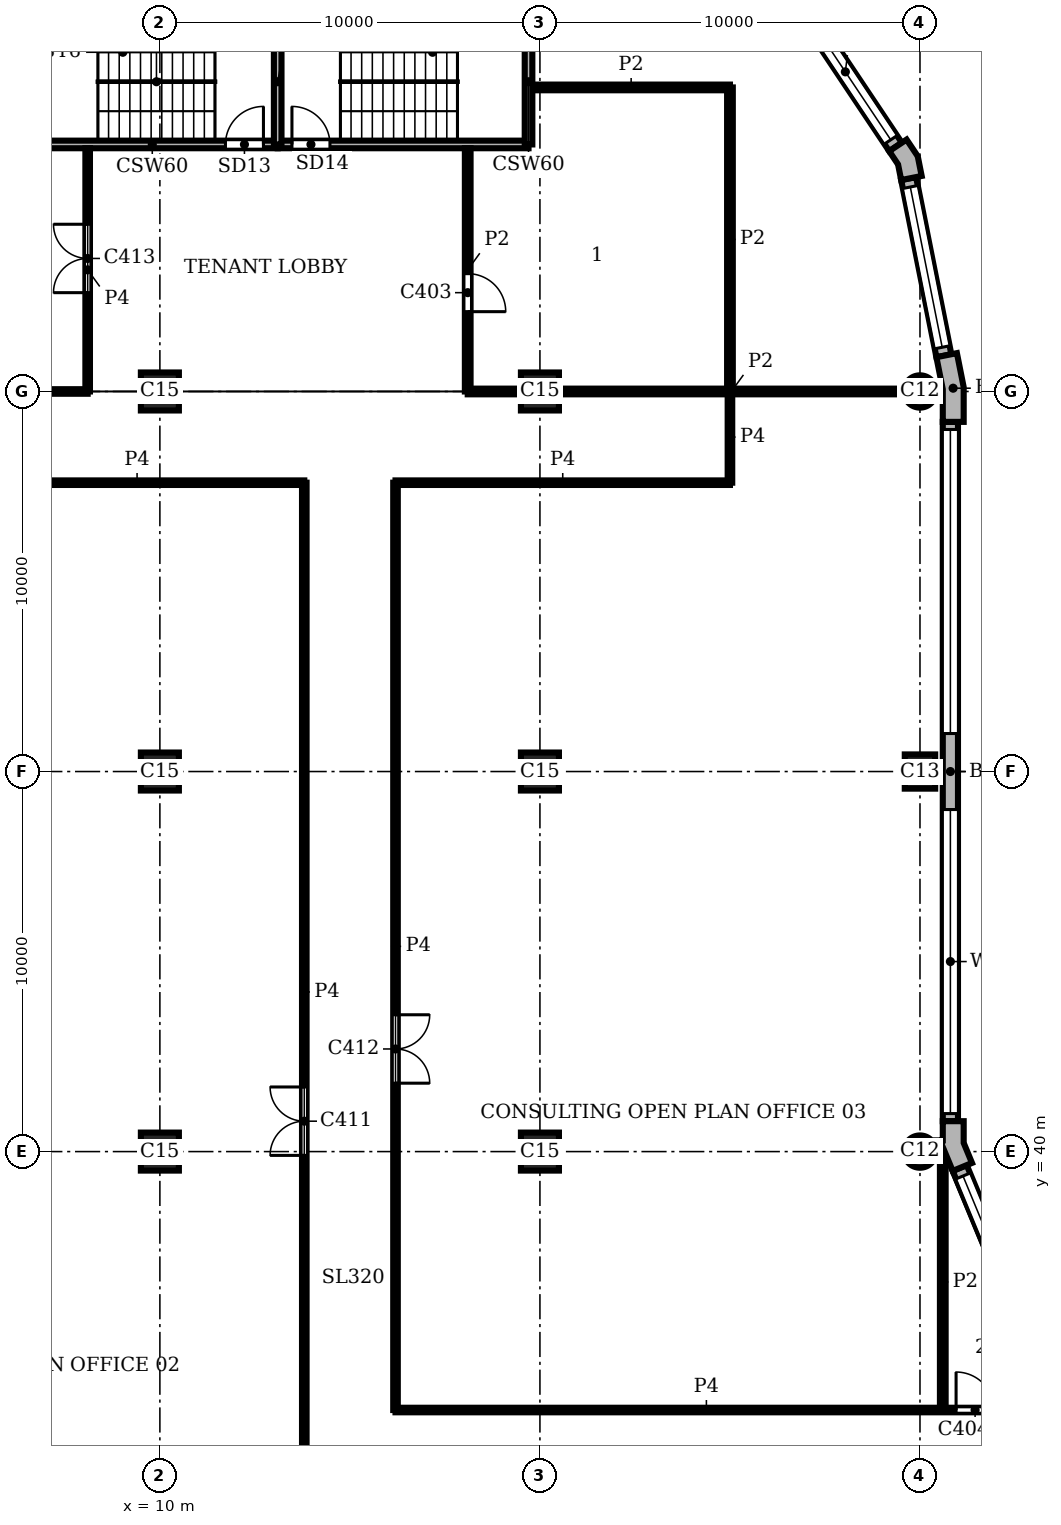
"""IFC4 building model, lengths in metres.
Left out: names, types, materials, properties, quantities, classifications, styles, units other than length and angle.
Written with IfcOpenShell. Run it as: python <this file> out.ifc"""

import sys

from ifc_helpers import new_model, si_unit, direction, frame, frame_2d, origin, origin_2d, place, context, subcontext, project, spatial, polyline, rectangle, circle, outline, extrude, element, fill, save


model = new_model("IFC4")
c1 = context("Model", 3, precision=1e-05, world=origin(), true_north=direction((0.0, 1.0)))
c2 = subcontext(c1, "Body", "Model", "MODEL_VIEW")
j1 = project(units=[si_unit("LENGTHUNIT", "METRE"), si_unit("PLANEANGLEUNIT", "RADIAN")], contexts=[c1])
p1 = place(None, origin())
s1 = spatial("IfcSite", under=j1, at=p1, CompositionType="ELEMENT")
p2 = place(p1, origin())
s2 = spatial("IfcBuilding", under=s1, at=p2, CompositionType="ELEMENT")
p3 = place(p2, frame((0.0, 0.0, 278.7)))
s3 = spatial("IfcBuildingStorey", under=s2, at=p3, CompositionType="ELEMENT", Elevation=278.7)
p4 = place(p3, frame((30.0, 40.0, 0.0), z_axis=(0.0, 0.0, 1.0), x_axis=(1.0, 0.0, 0.0)))
e1 = element("IfcColumn", 1, at=p4, inside=s3, PredefinedType="COLUMN", context=c2, shape_type="SweptSolid", body=[
    extrude(circle(Radius=0.425, at=origin_2d()), origin(), (0.0, 0.0, 1.0), 3.9),
])
p5 = place(p3, frame((30.0, 50.0, 0.0), z_axis=(0.0, 0.0, 1.0), x_axis=(0.0, 1.0, 0.0)))
e2 = element("IfcColumn", 2, at=p5, inside=s3, PredefinedType="COLUMN", context=c2, shape_type="SweptSolid", body=[
    extrude(rectangle(XDim=0.9, YDim=0.8, at=origin_2d()), origin(), (0.0, 0.0, 1.0), 3.9),
])
p6 = place(p3, frame((30.0, 60.0, 0.0), z_axis=(0.0, 0.0, 1.0), x_axis=(1.0, 0.0, 0.0)))
e3 = element("IfcColumn", 3, at=p6, inside=s3, PredefinedType="COLUMN", context=c2, shape_type="SweptSolid", body=[
    extrude(circle(Radius=0.425, at=origin_2d()), origin(), (0.0, 0.0, 1.0), 3.9),
])
for number, where, z_axis, x_axis in (
    (4, (10.0, 40.0, 0.0), (0.0, 0.0, 1.0), (1.0, 0.0, 0.0)),
    (5, (10.0, 50.0, 0.0), (0.0, 0.0, 1.0), (1.0, 0.0, 0.0)),
    (6, (10.0, 60.0, 0.0), (0.0, 0.0, 1.0), (1.0, 0.0, 0.0)),
    (7, (20.0, 40.0, 0.0), (0.0, 0.0, 1.0), (1.0, 0.0, 0.0)),
    (8, (20.0, 50.0, 0.0), (0.0, 0.0, 1.0), (1.0, 0.0, 0.0)),
    (9, (20.0, 60.0, 0.0), (0.0, 0.0, 1.0), (1.0, 0.0, 0.0)),
):
    element("IfcColumn", number, at=place(p3, frame(where, z_axis=z_axis, x_axis=x_axis)), inside=s3, PredefinedType="COLUMN", context=c2, shape_type="SweptSolid", body=[
        extrude(rectangle(XDim=1.0, YDim=1.0, at=origin_2d()), origin(), (0.0, 0.0, 1.0), 3.9),
    ])
p7 = place(p3, origin())
e10 = element("IfcWall", 10, at=p7, inside=s3, PredefinedType="SOLIDWALL", context=c2, shape_type="SweptSolid", body=[
    extrude(outline(polyline([(30.62, 39.995), (30.62, 40.071), (30.861, 39.49), (31.23, 39.644), (31.369, 39.701), (31.15, 40.229), (31.15, 40.8), (31.0, 40.8), (30.6, 40.8), (30.6, 40.295), (30.425, 40.295), (30.425, 39.995), (30.62, 39.995)])), origin(), (0.0, 0.0, 1.0), 3.9),
])
e11 = element("IfcWall", 11, at=p7, inside=s3, PredefinedType="SOLIDWALL", context=c2, shape_type="SweptSolid", body=[
    extrude(outline(polyline([(31.0, 59.2), (31.15, 59.2), (31.15, 60.113), (30.972, 61.009), (30.825, 60.98), (30.432, 60.902), (30.6, 60.059), (30.6, 59.2), (31.0, 59.2)])), origin(), (0.0, 0.0, 1.0), 3.9),
])
e12 = element("IfcWall", 12, at=p7, inside=s3, PredefinedType="SOLIDWALL", context=c2, shape_type="SweptSolid", body=[
    extrude(outline(polyline([(29.897, 65.641), (30.045, 65.67), (29.941, 66.189), (29.648, 66.629), (29.523, 66.545), (29.19, 66.323), (29.423, 65.974), (29.505, 65.563), (29.897, 65.641)])), origin(), (0.0, 0.0, 1.0), 3.9),
])
p8 = place(p3, frame((33.362, 33.974, 0.0), z_axis=(0.0, 0.0, 1.0), x_axis=(-0.382655745237, 0.923891000409, 0.0)))
e13 = element("IfcWall", 13, at=p8, inside=s3, PredefinedType="SOLIDWALL", context=c2, shape_type="SweptSolid", body=[
    extrude(rectangle(XDim=6.053, YDim=0.4, at=frame_2d((3.027, 0.0))), origin(), (0.0, 0.0, 1.0), 3.9),
])
p9 = place(p8, frame((0.227, 0.0, 0.9)))
e14 = element("IfcOpeningElement", 14, at=p9, cuts=e13, PredefinedType="OPENING", context=c2, shape_type="SweptSolid", body=[
    extrude(rectangle(XDim=5.6, YDim=2.35, at=frame_2d((2.8, 1.175))), frame((0.0, 0.21, 0.0), z_axis=(0.0, -1.0, 0.0), x_axis=(1.0, 0.0, 0.0)), (0.0, 0.0, 1.0), 0.42),
])
p10 = place(p3, frame((30.8, 40.8, 0.0), z_axis=(0.0, 0.0, 1.0), x_axis=(0.0, 1.0, 0.0)))
e15 = element("IfcWall", 15, at=p10, inside=s3, PredefinedType="SOLIDWALL", context=c2, shape_type="SweptSolid", body=[
    extrude(rectangle(XDim=18.4, YDim=0.4, at=frame_2d((9.2, 0.0))), origin(), (0.0, 0.0, 1.0), 3.9),
])
p11 = place(p10, frame((0.2, 0.0, 0.9)))
e16 = element("IfcOpeningElement", 16, at=p11, cuts=e15, PredefinedType="OPENING", context=c2, shape_type="SweptSolid", body=[
    extrude(rectangle(XDim=8.0, YDim=2.35, at=frame_2d((4.0, 1.175))), frame((0.0, 0.21, 0.0), z_axis=(0.0, -1.0, 0.0), x_axis=(1.0, 0.0, 0.0)), (0.0, 0.0, 1.0), 0.42),
])
p12 = place(p10, frame((10.2, 0.0, 0.9)))
e17 = element("IfcOpeningElement", 17, at=p12, cuts=e15, PredefinedType="OPENING", context=c2, shape_type="SweptSolid", body=[
    extrude(rectangle(XDim=8.0, YDim=2.35, at=frame_2d((4.0, 1.175))), frame((0.0, 0.21, 0.0), z_axis=(0.0, -1.0, 0.0), x_axis=(1.0, 0.0, 0.0)), (0.0, 0.0, 1.0), 0.42),
])
p13 = place(p3, frame((30.629, 60.941, 0.0), z_axis=(0.0, 0.0, 1.0), x_axis=(-0.195098533057, 0.98078364709, 0.0)))
e18 = element("IfcWall", 18, at=p13, inside=s3, PredefinedType="SOLIDWALL", context=c2, shape_type="SweptSolid", body=[
    extrude(rectangle(XDim=4.753, YDim=0.4, at=frame_2d((2.376, 0.0))), origin(), (0.0, 0.0, 1.0), 3.9),
])
p14 = place(p13, frame((0.226, 0.0, 0.9)))
e19 = element("IfcOpeningElement", 19, at=p14, cuts=e18, PredefinedType="OPENING", context=c2, shape_type="SweptSolid", body=[
    extrude(rectangle(XDim=4.3, YDim=2.35, at=frame_2d((2.15, 1.175))), frame((0.0, 0.21, 0.0), z_axis=(0.0, -1.0, 0.0), x_axis=(1.0, 0.0, 0.0)), (0.0, 0.0, 1.0), 0.42),
])
p15 = place(p3, frame((29.357, 66.434, 0.0), z_axis=(0.0, 0.0, 1.0), x_axis=(-0.555541552266, 0.831488775454, 0.0)))
e20 = element("IfcWall", 20, at=p15, inside=s3, PredefinedType="SOLIDWALL", context=c2, shape_type="SweptSolid", body=[
    extrude(rectangle(XDim=4.753, YDim=0.4, at=frame_2d((2.376, 0.0))), origin(), (0.0, 0.0, 1.0), 3.9),
])
p16 = place(p15, frame((0.226, 0.0, 0.9)))
e21 = element("IfcOpeningElement", 21, at=p16, cuts=e20, PredefinedType="OPENING", context=c2, shape_type="SweptSolid", body=[
    extrude(rectangle(XDim=4.3, YDim=2.35, at=frame_2d((2.15, 1.175))), frame((0.0, 0.21, 0.0), z_axis=(0.0, -1.0, 0.0), x_axis=(1.0, 0.0, 0.0)), (0.0, 0.0, 1.0), 0.42),
])
p17 = place(p3, frame((6.5, 66.5, 0.0), z_axis=(0.0, 0.0, 1.0), x_axis=(1.0, 0.0, 0.0)))
e22 = element("IfcWall", 22, at=p17, inside=s3, PredefinedType="SHEAR", context=c2, shape_type="SweptSolid", body=[
    extrude(rectangle(XDim=6.6, YDim=0.2, at=frame_2d((3.3, 0.0))), origin(), (0.0, 0.0, 1.0), 3.58),
])
p18 = place(p17, frame((5.225, 0.0, 0.0)))
e23 = element("IfcOpeningElement", 23, at=p18, cuts=e22, PredefinedType="OPENING", context=c2, shape_type="SweptSolid", body=[
    extrude(rectangle(XDim=1.0, YDim=2.1, at=frame_2d((0.5, 1.05))), frame((0.0, 0.11, 0.0), z_axis=(0.0, -1.0, 0.0), x_axis=(1.0, 0.0, 0.0)), (0.0, 0.0, 1.0), 0.22),
])
p19 = place(p3, frame((13.1, 66.5, 0.0), z_axis=(0.0, 0.0, 1.0), x_axis=(1.0, 0.0, 0.0)))
e24 = element("IfcWall", 24, at=p19, inside=s3, PredefinedType="SHEAR", context=c2, shape_type="SweptSolid", body=[
    extrude(rectangle(XDim=6.6, YDim=0.2, at=frame_2d((3.3, 0.0))), origin(), (0.0, 0.0, 1.0), 3.58),
])
p20 = place(p19, frame((0.375, 0.0, 0.0)))
e25 = element("IfcOpeningElement", 25, at=p20, cuts=e24, PredefinedType="OPENING", context=c2, shape_type="SweptSolid", body=[
    extrude(rectangle(XDim=1.0, YDim=2.1, at=frame_2d((0.5, 1.05))), frame((0.0, 0.11, 0.0), z_axis=(0.0, -1.0, 0.0), x_axis=(1.0, 0.0, 0.0)), (0.0, 0.0, 1.0), 0.22),
])
for number, where, z_axis, x_axis in (
    (26, (13.1, 66.5, 0.0), (0.0, 0.0, 1.0), (0.0, 1.0, 0.0)),
    (27, (19.7, 66.5, 0.0), (0.0, 0.0, 1.0), (0.0, 1.0, 0.0)),
):
    element("IfcWall", number, at=place(p3, frame(where, z_axis=z_axis, x_axis=x_axis)), inside=s3, PredefinedType="SHEAR", context=c2, shape_type="SweptSolid", body=[
        extrude(rectangle(XDim=3.3, YDim=0.2, at=frame_2d((1.65, 0.0))), origin(), (0.0, 0.0, 1.0), 3.58),
    ])
p21 = place(p3, frame((18.1, 60.0, 0.0), z_axis=(0.0, 0.0, 1.0), x_axis=(0.0, 1.0, 0.0)))
e28 = element("IfcWall", 28, at=p21, inside=s3, PredefinedType="PARTITIONING", context=c2, shape_type="SweptSolid", body=[
    extrude(rectangle(XDim=6.4, YDim=0.15, at=frame_2d((3.2, 0.0))), origin(), (0.0, 0.0, 1.0), 3.58),
])
p22 = place(p21, frame((2.1, 0.0, 0.0)))
e29 = element("IfcOpeningElement", 29, at=p22, cuts=e28, PredefinedType="OPENING", context=c2, shape_type="SweptSolid", body=[
    extrude(rectangle(XDim=1.0, YDim=2.1, at=frame_2d((0.5, 1.05))), frame((0.0, 0.085, 0.0), z_axis=(0.0, -1.0, 0.0), x_axis=(1.0, 0.0, 0.0)), (0.0, 0.0, 1.0), 0.17),
])
p23 = place(p3, frame((25.0, 60.0, 0.0), z_axis=(0.0, 0.0, 1.0), x_axis=(0.0, 1.0, 0.0)))
e30 = element("IfcWall", 30, at=p23, inside=s3, PredefinedType="PARTITIONING", context=c2, shape_type="SweptSolid", body=[
    extrude(rectangle(XDim=8.0, YDim=0.15, at=frame_2d((4.0, 0.0))), origin(), (0.0, 0.0, 1.0), 3.58),
])
p24 = place(p3, frame((30.6, 33.2, 0.0), z_axis=(0.0, 0.0, 1.0), x_axis=(0.0, 1.0, 0.0)))
e31 = element("IfcWall", 31, at=p24, inside=s3, PredefinedType="PARTITIONING", context=c2, shape_type="SweptSolid", body=[
    extrude(rectangle(XDim=6.738, YDim=0.15, at=frame_2d((3.369, 0.0))), origin(), (0.0, 0.0, 1.0), 3.58),
])
p25 = place(p3, frame((18.1, 60.0, 0.0), z_axis=(0.0, 0.0, 1.0), x_axis=(1.0, 0.0, 0.0)))
e32 = element("IfcWall", 32, at=p25, inside=s3, PredefinedType="PARTITIONING", context=c2, shape_type="SweptSolid", body=[
    extrude(rectangle(XDim=1.4, YDim=0.15, at=frame_2d((0.7, 0.0))), origin(), (0.0, 0.0, 1.0), 3.58),
])
p26 = place(p3, frame((20.5, 60.0, 0.0), z_axis=(0.0, 0.0, 1.0), x_axis=(1.0, 0.0, 0.0)))
e33 = element("IfcWall", 33, at=p26, inside=s3, PredefinedType="PARTITIONING", context=c2, shape_type="SweptSolid", body=[
    extrude(rectangle(XDim=9.075, YDim=0.15, at=frame_2d((4.538, 0.0))), origin(), (0.0, 0.0, 1.0), 3.58),
])
p27 = place(p3, frame((19.8, 68.0, 0.0), z_axis=(0.0, 0.0, 1.0), x_axis=(1.0, 0.0, 0.0)))
e34 = element("IfcWall", 34, at=p27, inside=s3, PredefinedType="PARTITIONING", context=c2, shape_type="SweptSolid", body=[
    extrude(rectangle(XDim=5.2, YDim=0.15, at=frame_2d((2.6, 0.0))), origin(), (0.0, 0.0, 1.0), 3.58),
])
p28 = place(p3, frame((8.1, 60.0, 0.0), z_axis=(0.0, 0.0, 1.0), x_axis=(0.0, 1.0, 0.0)))
e35 = element("IfcWall", 35, at=p28, inside=s3, PredefinedType="PARTITIONING", context=c2, shape_type="SweptSolid", body=[
    extrude(rectangle(XDim=6.4, YDim=0.12, at=frame_2d((3.2, 0.0))), origin(), (0.0, 0.0, 1.0), 3.58),
])
p29 = place(p28, frame((2.6, 0.0, 0.0)))
e36 = element("IfcOpeningElement", 36, at=p29, cuts=e35, PredefinedType="OPENING", context=c2, shape_type="SweptSolid", body=[
    extrude(rectangle(XDim=1.8, YDim=2.1, at=frame_2d((0.9, 1.05))), frame((0.0, 0.07, 0.0), z_axis=(0.0, -1.0, 0.0), x_axis=(1.0, 0.0, 0.0)), (0.0, 0.0, 1.0), 0.14),
])
p30 = place(p3, frame((13.8, 30.8, 0.0), z_axis=(0.0, 0.0, 1.0), x_axis=(0.0, 1.0, 0.0)))
e37 = element("IfcWall", 37, at=p30, inside=s3, PredefinedType="PARTITIONING", context=c2, shape_type="SweptSolid", body=[
    extrude(rectangle(XDim=26.8, YDim=0.12, at=frame_2d((13.4, 0.0))), origin(), (0.0, 0.0, 1.0), 3.58),
])
p31 = place(p30, frame((9.1, 0.0, 0.0)))
e38 = element("IfcOpeningElement", 38, at=p31, cuts=e37, PredefinedType="OPENING", context=c2, shape_type="SweptSolid", body=[
    extrude(rectangle(XDim=1.8, YDim=2.1, at=frame_2d((0.9, 1.05))), frame((0.0, 0.07, 0.0), z_axis=(0.0, -1.0, 0.0), x_axis=(1.0, 0.0, 0.0)), (0.0, 0.0, 1.0), 0.14),
])
p32 = place(p3, frame((16.2, 33.2, 0.0), z_axis=(0.0, 0.0, 1.0), x_axis=(0.0, 1.0, 0.0)))
e39 = element("IfcWall", 39, at=p32, inside=s3, PredefinedType="PARTITIONING", context=c2, shape_type="SweptSolid", body=[
    extrude(rectangle(XDim=24.4, YDim=0.12, at=frame_2d((12.2, 0.0))), origin(), (0.0, 0.0, 1.0), 3.58),
])
p33 = place(p32, frame((8.6, 0.0, 0.0)))
e40 = element("IfcOpeningElement", 40, at=p33, cuts=e39, PredefinedType="OPENING", context=c2, shape_type="SweptSolid", body=[
    extrude(rectangle(XDim=1.8, YDim=2.1, at=frame_2d((0.9, 1.05))), frame((0.0, 0.07, 0.0), z_axis=(0.0, -1.0, 0.0), x_axis=(1.0, 0.0, 0.0)), (0.0, 0.0, 1.0), 0.14),
])
p34 = place(p3, frame((25.0, 57.6, 0.0), z_axis=(0.0, 0.0, 1.0), x_axis=(0.0, 1.0, 0.0)))
e41 = element("IfcWall", 41, at=p34, inside=s3, PredefinedType="PARTITIONING", context=c2, shape_type="SweptSolid", body=[
    extrude(rectangle(XDim=2.4, YDim=0.12, at=frame_2d((1.2, 0.0))), origin(), (0.0, 0.0, 1.0), 3.58),
])
p35 = place(p3, frame((16.2, 33.2, 0.0), z_axis=(0.0, 0.0, 1.0), x_axis=(1.0, 0.0, 0.0)))
e42 = element("IfcWall", 42, at=p35, inside=s3, PredefinedType="PARTITIONING", context=c2, shape_type="SweptSolid", body=[
    extrude(rectangle(XDim=16.36, YDim=0.12, at=frame_2d((8.18, 0.0))), origin(), (0.0, 0.0, 1.0), 3.58),
])
p36 = place(p35, frame((14.75, 0.0, 0.0)))
e43 = element("IfcOpeningElement", 43, at=p36, cuts=e42, PredefinedType="OPENING", context=c2, shape_type="SweptSolid", body=[
    extrude(rectangle(XDim=1.0, YDim=2.1, at=frame_2d((0.5, 1.05))), frame((0.0, 0.07, 0.0), z_axis=(0.0, -1.0, 0.0), x_axis=(1.0, 0.0, 0.0)), (0.0, 0.0, 1.0), 0.14),
])
for number, where, z_axis, x_axis in (
    (44, (5.0, 57.6, 0.0), (0.0, 0.0, 1.0), (1.0, 0.0, 0.0)),
    (45, (16.2, 57.6, 0.0), (0.0, 0.0, 1.0), (1.0, 0.0, 0.0)),
):
    element("IfcWall", number, at=place(p3, frame(where, z_axis=z_axis, x_axis=x_axis)), inside=s3, PredefinedType="PARTITIONING", context=c2, shape_type="SweptSolid", body=[
        extrude(rectangle(XDim=8.8, YDim=0.12, at=frame_2d((4.4, 0.0))), origin(), (0.0, 0.0, 1.0), 3.58),
    ])
p37 = place(p3, frame((5.0, 60.0, 0.0), z_axis=(0.0, 0.0, 1.0), x_axis=(1.0, 0.0, 0.0)))
e46 = element("IfcWall", 46, at=p37, inside=s3, PredefinedType="PARTITIONING", context=c2, shape_type="SweptSolid", body=[
    extrude(rectangle(XDim=3.1, YDim=0.12, at=frame_2d((1.55, 0.0))), origin(), (0.0, 0.0, 1.0), 3.58),
])
p38 = place(p9, origin())
e47 = element("IfcWindow", 47, at=p38, inside=s3, PartitioningType="SINGLE_PANEL", PredefinedType="WINDOW", context=c2, shape_type="SweptSolid", body=[
    extrude(rectangle(XDim=5.6, YDim=2.35, at=frame_2d((2.8, 1.175))), frame((0.0, 0.16, 0.0), z_axis=(0.0, -1.0, 0.0), x_axis=(1.0, 0.0, 0.0)), (0.0, 0.0, 1.0), 0.06),
])
fill(e14, e47)
p39 = place(p11, origin())
e48 = element("IfcWindow", 48, at=p39, inside=s3, PartitioningType="SINGLE_PANEL", PredefinedType="WINDOW", context=c2, shape_type="SweptSolid", body=[
    extrude(rectangle(XDim=8.0, YDim=2.35, at=frame_2d((4.0, 1.175))), frame((0.0, 0.16, 0.0), z_axis=(0.0, -1.0, 0.0), x_axis=(1.0, 0.0, 0.0)), (0.0, 0.0, 1.0), 0.06),
])
fill(e16, e48)
p40 = place(p12, origin())
e49 = element("IfcWindow", 49, at=p40, inside=s3, PartitioningType="SINGLE_PANEL", PredefinedType="WINDOW", context=c2, shape_type="SweptSolid", body=[
    extrude(rectangle(XDim=8.0, YDim=2.35, at=frame_2d((4.0, 1.175))), frame((0.0, 0.16, 0.0), z_axis=(0.0, -1.0, 0.0), x_axis=(1.0, 0.0, 0.0)), (0.0, 0.0, 1.0), 0.06),
])
fill(e17, e49)
p41 = place(p14, origin())
e50 = element("IfcWindow", 50, at=p41, inside=s3, PartitioningType="SINGLE_PANEL", PredefinedType="WINDOW", context=c2, shape_type="SweptSolid", body=[
    extrude(rectangle(XDim=4.3, YDim=2.35, at=frame_2d((2.15, 1.175))), frame((0.0, 0.16, 0.0), z_axis=(0.0, -1.0, 0.0), x_axis=(1.0, 0.0, 0.0)), (0.0, 0.0, 1.0), 0.06),
])
fill(e19, e50)
p42 = place(p16, origin())
e51 = element("IfcWindow", 51, at=p42, inside=s3, PartitioningType="SINGLE_PANEL", PredefinedType="WINDOW", context=c2, shape_type="SweptSolid", body=[
    extrude(rectangle(XDim=4.3, YDim=2.35, at=frame_2d((2.15, 1.175))), frame((0.0, 0.16, 0.0), z_axis=(0.0, -1.0, 0.0), x_axis=(1.0, 0.0, 0.0)), (0.0, 0.0, 1.0), 0.06),
])
fill(e21, e51)
p43 = place(p18, origin())
e52 = element("IfcDoor", 52, at=p43, inside=s3, OperationType="SINGLE_SWING_RIGHT", PredefinedType="DOOR", context=c2, shape_type="SweptSolid", body=[
    extrude(rectangle(XDim=1.0, YDim=2.1, at=frame_2d((0.5, 1.05))), frame((0.0, 0.025, 0.0), z_axis=(0.0, -1.0, 0.0), x_axis=(1.0, 0.0, 0.0)), (0.0, 0.0, 1.0), 0.05),
])
fill(e23, e52)
p44 = place(p20, origin())
e53 = element("IfcDoor", 53, at=p44, inside=s3, OperationType="SINGLE_SWING_LEFT", PredefinedType="DOOR", context=c2, shape_type="SweptSolid", body=[
    extrude(rectangle(XDim=1.0, YDim=2.1, at=frame_2d((0.5, 1.05))), frame((0.0, 0.025, 0.0), z_axis=(0.0, -1.0, 0.0), x_axis=(1.0, 0.0, 0.0)), (0.0, 0.0, 1.0), 0.05),
])
fill(e25, e53)
p45 = place(p22, frame((1.0, 0.0, 0.0), z_axis=(0.0, 0.0, 1.0), x_axis=(-1.0, 0.0, 0.0)))
e54 = element("IfcDoor", 54, at=p45, inside=s3, OperationType="SINGLE_SWING_RIGHT", PredefinedType="DOOR", context=c2, shape_type="SweptSolid", body=[
    extrude(rectangle(XDim=1.0, YDim=2.1, at=frame_2d((0.5, 1.05))), frame((0.0, 0.025, 0.0), z_axis=(0.0, -1.0, 0.0), x_axis=(1.0, 0.0, 0.0)), (0.0, 0.0, 1.0), 0.05),
])
fill(e29, e54)
p46 = place(p36, origin())
e55 = element("IfcDoor", 55, at=p46, inside=s3, OperationType="SINGLE_SWING_LEFT", PredefinedType="DOOR", context=c2, shape_type="SweptSolid", body=[
    extrude(rectangle(XDim=1.0, YDim=2.1, at=frame_2d((0.5, 1.05))), frame((0.0, 0.025, 0.0), z_axis=(0.0, -1.0, 0.0), x_axis=(1.0, 0.0, 0.0)), (0.0, 0.0, 1.0), 0.05),
])
fill(e43, e55)
p47 = place(p31, origin())
e56 = element("IfcDoor", 56, at=p47, inside=s3, OperationType="DOUBLE_DOOR_SINGLE_SWING", PredefinedType="DOOR", context=c2, shape_type="SweptSolid", body=[
    extrude(rectangle(XDim=1.8, YDim=2.1, at=frame_2d((0.9, 1.05))), frame((0.0, 0.025, 0.0), z_axis=(0.0, -1.0, 0.0), x_axis=(1.0, 0.0, 0.0)), (0.0, 0.0, 1.0), 0.05),
])
fill(e38, e56)
p48 = place(p33, frame((1.8, 0.0, 0.0), z_axis=(0.0, 0.0, 1.0), x_axis=(-1.0, 0.0, 0.0)))
e57 = element("IfcDoor", 57, at=p48, inside=s3, OperationType="DOUBLE_DOOR_SINGLE_SWING", PredefinedType="DOOR", context=c2, shape_type="SweptSolid", body=[
    extrude(rectangle(XDim=1.8, YDim=2.1, at=frame_2d((0.9, 1.05))), frame((0.0, 0.025, 0.0), z_axis=(0.0, -1.0, 0.0), x_axis=(1.0, 0.0, 0.0)), (0.0, 0.0, 1.0), 0.05),
])
fill(e40, e57)
p49 = place(p29, origin())
e58 = element("IfcDoor", 58, at=p49, inside=s3, OperationType="DOUBLE_DOOR_SINGLE_SWING", PredefinedType="DOOR", context=c2, shape_type="SweptSolid", body=[
    extrude(rectangle(XDim=1.8, YDim=2.1, at=frame_2d((0.9, 1.05))), frame((0.0, 0.025, 0.0), z_axis=(0.0, -1.0, 0.0), x_axis=(1.0, 0.0, 0.0)), (0.0, 0.0, 1.0), 0.05),
])
fill(e36, e58)
save(model, sys.argv[1])
